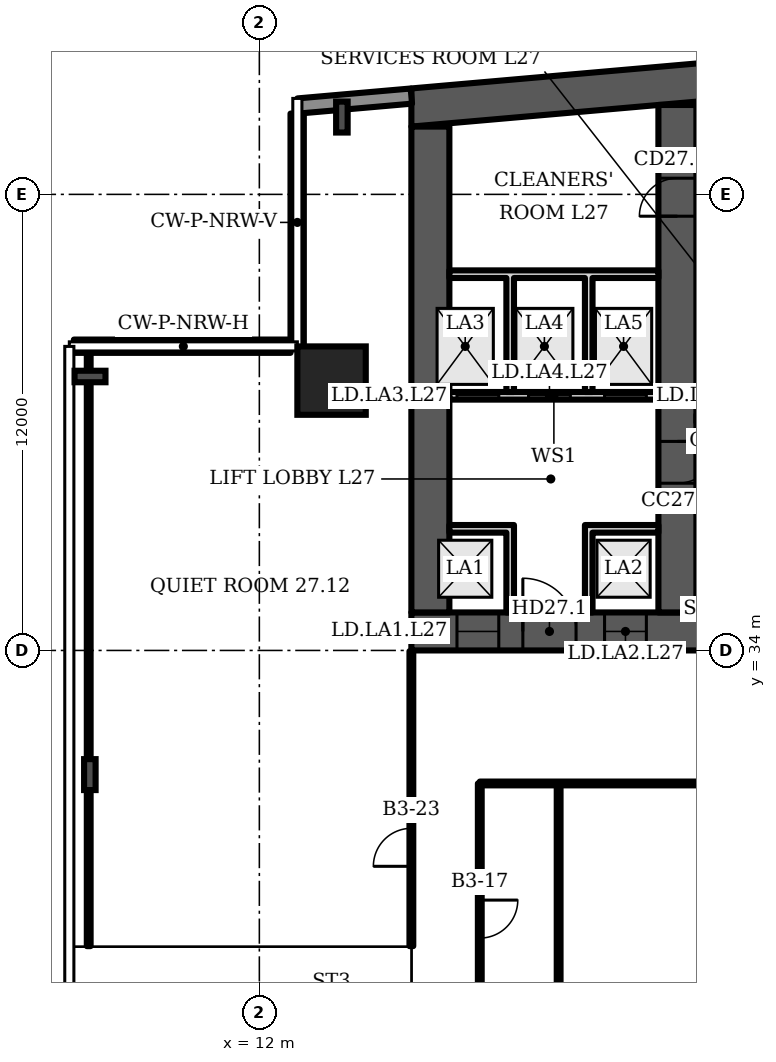
"""IFC4 building model, lengths in metres.
Left out: names, types, materials, properties, quantities, classifications, styles, units other than length and angle.
Written with IfcOpenShell. Run it as: python <this file> out.ifc"""

import sys

from ifc_helpers import new_model, si_unit, direction, frame, frame_2d, origin, origin_2d, place, context, subcontext, project, spatial, polyline, rectangle, i_section, outline, extrude, element, fill, save


model = new_model("IFC4")
c1 = context("Model", 3, precision=1e-05, world=origin(), true_north=direction((0.0, 1.0)))
c2 = subcontext(c1, "Body", "Model", "MODEL_VIEW")
j1 = project(units=[si_unit("LENGTHUNIT", "METRE"), si_unit("PLANEANGLEUNIT", "RADIAN")], contexts=[c1])
p1 = place(None, origin())
s1 = spatial("IfcSite", under=j1, at=p1, CompositionType="ELEMENT")
p2 = place(p1, origin())
s2 = spatial("IfcBuilding", under=s1, at=p2, CompositionType="ELEMENT")
p3 = place(p2, frame((0.0, 0.0, 118.3)))
s3 = spatial("IfcBuildingStorey", under=s2, at=p3, CompositionType="ELEMENT", Elevation=118.3)
p4 = place(p3, frame((0.0, 0.0, -0.0)))
e1 = element("IfcWall", 1, at=p4, inside=s3, PredefinedType="SHEAR", context=c2, shape_type="SweptSolid", body=[
    extrude(outline(polyline([(16.0, 47.784), (40.5, 49.927), (65.0, 47.784), (65.0, 48.787), (40.5, 50.931), (16.0, 48.787), (16.0, 47.784)])), origin(), (0.0, 0.0, 1.0), 3.6),
])
p5 = place(p3, frame((16.0, 34.5, 0.0), z_axis=(0.0, 0.0, 1.0), x_axis=(1.0, 0.0, 0.0)))
e2 = element("IfcWall", 2, at=p5, inside=s3, PredefinedType="SHEAR", context=c2, shape_type="SweptSolid", body=[
    extrude(rectangle(XDim=49.0, YDim=1.0, at=frame_2d((24.5, 0.0))), origin(), (0.0, 0.0, 1.0), 3.6),
])
p6 = place(p5, frame((1.2, 0.0, 0.0)))
e3 = element("IfcOpeningElement", 3, at=p6, cuts=e2, PredefinedType="OPENING", context=c2, shape_type="SweptSolid", body=[
    extrude(rectangle(XDim=1.1, YDim=2.1, at=frame_2d((0.55, 1.05))), frame((0.0, 0.51, 0.0), z_axis=(0.0, -1.0, 0.0), x_axis=(1.0, 0.0, 0.0)), (0.0, 0.0, 1.0), 1.02),
])
p7 = place(p5, frame((5.083, 0.0, 0.0)))
e4 = element("IfcOpeningElement", 4, at=p7, cuts=e2, PredefinedType="OPENING", context=c2, shape_type="SweptSolid", body=[
    extrude(rectangle(XDim=1.1, YDim=2.1, at=frame_2d((0.55, 1.05))), frame((0.0, 0.51, 0.0), z_axis=(0.0, -1.0, 0.0), x_axis=(1.0, 0.0, 0.0)), (0.0, 0.0, 1.0), 1.02),
])
p8 = place(p5, frame((2.933, 0.0, 0.0)))
e5 = element("IfcOpeningElement", 5, at=p8, cuts=e2, PredefinedType="OPENING", context=c2, shape_type="SweptSolid", body=[
    extrude(rectangle(XDim=1.4, YDim=2.1, at=frame_2d((0.7, 1.05))), frame((0.0, 0.51, 0.0), z_axis=(0.0, -1.0, 0.0), x_axis=(1.0, 0.0, 0.0)), (0.0, 0.0, 1.0), 1.02),
])
p9 = place(p5, frame((7.65, 0.0, 0.0)))
e6 = element("IfcOpeningElement", 6, at=p9, cuts=e2, PredefinedType="OPENING", context=c2, shape_type="SweptSolid", body=[
    extrude(rectangle(XDim=1.2, YDim=2.1, at=frame_2d((0.6, 1.05))), frame((0.0, 0.51, 0.0), z_axis=(0.0, -1.0, 0.0), x_axis=(1.0, 0.0, 0.0)), (0.0, 0.0, 1.0), 1.02),
])
p10 = place(p5, frame((14.817, 0.0, 0.0)))
e7 = element("IfcOpeningElement", 7, at=p10, cuts=e2, PredefinedType="OPENING", context=c2, shape_type="SweptSolid", body=[
    extrude(rectangle(XDim=1.1, YDim=2.1, at=frame_2d((0.55, 1.05))), frame((0.0, 0.51, 0.0), z_axis=(0.0, -1.0, 0.0), x_axis=(1.0, 0.0, 0.0)), (0.0, 0.0, 1.0), 1.02),
])
p11 = place(p5, frame((19.083, 0.0, 0.0)))
e8 = element("IfcOpeningElement", 8, at=p11, cuts=e2, PredefinedType="OPENING", context=c2, shape_type="SweptSolid", body=[
    extrude(rectangle(XDim=1.1, YDim=2.1, at=frame_2d((0.55, 1.05))), frame((0.0, 0.51, 0.0), z_axis=(0.0, -1.0, 0.0), x_axis=(1.0, 0.0, 0.0)), (0.0, 0.0, 1.0), 1.02),
])
p12 = place(p5, frame((16.8, 0.0, 0.0)))
e9 = element("IfcOpeningElement", 9, at=p12, cuts=e2, PredefinedType="OPENING", context=c2, shape_type="SweptSolid", body=[
    extrude(rectangle(XDim=1.4, YDim=2.1, at=frame_2d((0.7, 1.05))), frame((0.0, 0.51, 0.0), z_axis=(0.0, -1.0, 0.0), x_axis=(1.0, 0.0, 0.0)), (0.0, 0.0, 1.0), 1.02),
])
p13 = place(p5, frame((21.817, 0.0, 0.0)))
e10 = element("IfcOpeningElement", 10, at=p13, cuts=e2, PredefinedType="OPENING", context=c2, shape_type="SweptSolid", body=[
    extrude(rectangle(XDim=1.1, YDim=2.1, at=frame_2d((0.55, 1.05))), frame((0.0, 0.51, 0.0), z_axis=(0.0, -1.0, 0.0), x_axis=(1.0, 0.0, 0.0)), (0.0, 0.0, 1.0), 1.02),
])
p14 = place(p5, frame((26.083, 0.0, 0.0)))
e11 = element("IfcOpeningElement", 11, at=p14, cuts=e2, PredefinedType="OPENING", context=c2, shape_type="SweptSolid", body=[
    extrude(rectangle(XDim=1.1, YDim=2.1, at=frame_2d((0.55, 1.05))), frame((0.0, 0.51, 0.0), z_axis=(0.0, -1.0, 0.0), x_axis=(1.0, 0.0, 0.0)), (0.0, 0.0, 1.0), 1.02),
])
p15 = place(p5, frame((33.15, 0.0, 0.0)))
e12 = element("IfcOpeningElement", 12, at=p15, cuts=e2, PredefinedType="OPENING", context=c2, shape_type="SweptSolid", body=[
    extrude(rectangle(XDim=1.2, YDim=2.1, at=frame_2d((0.6, 1.05))), frame((0.0, 0.51, 0.0), z_axis=(0.0, -1.0, 0.0), x_axis=(1.0, 0.0, 0.0)), (0.0, 0.0, 1.0), 1.02),
])
p16 = place(p5, frame((37.8, 0.0, 0.0)))
e13 = element("IfcOpeningElement", 13, at=p16, cuts=e2, PredefinedType="OPENING", context=c2, shape_type="SweptSolid", body=[
    extrude(rectangle(XDim=1.4, YDim=2.1, at=frame_2d((0.7, 1.05))), frame((0.0, 0.51, 0.0), z_axis=(0.0, -1.0, 0.0), x_axis=(1.0, 0.0, 0.0)), (0.0, 0.0, 1.0), 1.02),
])
p17 = place(p5, frame((42.817, 0.0, 0.0)))
e14 = element("IfcOpeningElement", 14, at=p17, cuts=e2, PredefinedType="OPENING", context=c2, shape_type="SweptSolid", body=[
    extrude(rectangle(XDim=1.1, YDim=2.1, at=frame_2d((0.55, 1.05))), frame((0.0, 0.51, 0.0), z_axis=(0.0, -1.0, 0.0), x_axis=(1.0, 0.0, 0.0)), (0.0, 0.0, 1.0), 1.02),
])
p18 = place(p5, frame((46.7, 0.0, 0.0)))
e15 = element("IfcOpeningElement", 15, at=p18, cuts=e2, PredefinedType="OPENING", context=c2, shape_type="SweptSolid", body=[
    extrude(rectangle(XDim=1.1, YDim=2.1, at=frame_2d((0.55, 1.05))), frame((0.0, 0.51, 0.0), z_axis=(0.0, -1.0, 0.0), x_axis=(1.0, 0.0, 0.0)), (0.0, 0.0, 1.0), 1.02),
])
p19 = place(p5, frame((44.667, 0.0, 0.0)))
e16 = element("IfcOpeningElement", 16, at=p19, cuts=e2, PredefinedType="OPENING", context=c2, shape_type="SweptSolid", body=[
    extrude(rectangle(XDim=1.4, YDim=2.1, at=frame_2d((0.7, 1.05))), frame((0.0, 0.51, 0.0), z_axis=(0.0, -1.0, 0.0), x_axis=(1.0, 0.0, 0.0)), (0.0, 0.0, 1.0), 1.02),
])
p20 = place(p3, frame((16.5, 35.0, 0.0), z_axis=(0.0, 0.0, 1.0), x_axis=(0.0, 1.0, 0.0)))
e17 = element("IfcWall", 17, at=p20, inside=s3, PredefinedType="SHEAR", context=c2, shape_type="SweptSolid", body=[
    extrude(rectangle(XDim=12.784, YDim=1.0, at=frame_2d((6.392, 0.0))), origin(), (0.0, 0.0, 1.0), 3.6),
])
p21 = place(p3, frame((23.0, 35.0, 0.0), z_axis=(0.0, 0.0, 1.0), x_axis=(0.0, 1.0, 0.0)))
e18 = element("IfcWall", 18, at=p21, inside=s3, PredefinedType="SHEAR", context=c2, shape_type="SweptSolid", body=[
    extrude(rectangle(XDim=13.352, YDim=1.0, at=frame_2d((6.676, 0.0))), origin(), (0.0, 0.0, 1.0), 3.6),
])
p22 = place(p21, frame((10.426, 0.0, 0.0)))
e19 = element("IfcOpeningElement", 19, at=p22, cuts=e18, PredefinedType="OPENING", context=c2, shape_type="SweptSolid", body=[
    extrude(rectangle(XDim=1.0, YDim=2.1, at=frame_2d((0.5, 1.05))), frame((0.0, 0.51, 0.0), z_axis=(0.0, -1.0, 0.0), x_axis=(1.0, 0.0, 0.0)), (0.0, 0.0, 1.0), 1.02),
])
p23 = place(p21, frame((3.4, 0.0, 0.0)))
e20 = element("IfcOpeningElement", 20, at=p23, cuts=e18, PredefinedType="OPENING", context=c2, shape_type="SweptSolid", body=[
    extrude(rectangle(XDim=1.1, YDim=2.1, at=frame_2d((0.55, 1.05))), frame((0.0, 0.51, 0.0), z_axis=(0.0, -1.0, 0.0), x_axis=(1.0, 0.0, 0.0)), (0.0, 0.0, 1.0), 1.02),
])
p24 = place(p3, frame((13.9, 41.1, 0.0), z_axis=(0.0, 0.0, 1.0), x_axis=(1.0, 0.0, 0.0)))
e21 = element("IfcColumn", 21, at=p24, inside=s3, PredefinedType="COLUMN", context=c2, shape_type="SweptSolid", body=[
    extrude(rectangle(XDim=1.8, YDim=1.8, at=origin_2d()), origin(), (0.0, 0.0, 1.0), 3.6),
])
for number, where, z_axis, x_axis in (
    (22, (14.172, 48.034, 0.0), (0.0, 0.0, 1.0), (-1.0, 0.0, 0.0)),
    (23, (7.544, 41.208, 0.0), (0.0, 0.0, 1.0), (0.0, 1.0, 0.0)),
    (24, (7.54, 30.733, 0.0), (0.0, 0.0, 1.0), (-1.0, 0.0, 0.0)),
):
    element("IfcColumn", number, at=place(p3, frame(where, z_axis=z_axis, x_axis=x_axis)), inside=s3, PredefinedType="COLUMN", context=c2, shape_type="SweptSolid", body=[
        extrude(i_section(OverallWidth=0.303, OverallDepth=0.814, WebThickness=0.021, FlangeThickness=0.04, FilletRadius=0.03, at=origin_2d()), origin(), (0.0, 0.0, 1.0), 3.6),
    ])
p25 = place(p3, frame((16.0, 48.587, 0.0), z_axis=(0.0, 0.0, 1.0), x_axis=(-0.996194, -0.087168, 0.0)))
e25 = element("IfcWall", 25, at=p25, inside=s3, PredefinedType="SOLIDWALL", context=c2, shape_type="SweptSolid", body=[
    extrude(rectangle(XDim=2.994, YDim=0.4, at=frame_2d((1.497, 0.0))), origin(), (0.0, 0.0, 1.0), 3.2),
])
p26 = place(p3, frame((12.995, 48.126, 0.0), z_axis=(0.0, 0.0, 1.0), x_axis=(0.0, -1.0, 0.0)))
e26 = element("IfcWall", 26, at=p26, inside=s3, PredefinedType="SOLIDWALL", context=c2, shape_type="SweptSolid", body=[
    extrude(rectangle(XDim=6.126, YDim=0.35, at=frame_2d((3.063, 0.0))), origin(), (0.0, 0.0, 1.0), 1.0),
])
p27 = place(p3, frame((12.82, 42.005, 0.0), z_axis=(0.0, 0.0, 1.0), x_axis=(-1.0, 0.0, 0.0)))
e27 = element("IfcWall", 27, at=p27, inside=s3, PredefinedType="SOLIDWALL", context=c2, shape_type="SweptSolid", body=[
    extrude(rectangle(XDim=5.7, YDim=0.35, at=frame_2d((2.85, 0.0))), origin(), (0.0, 0.0, 1.0), 1.0),
])
p28 = place(p3, frame((17.0, 40.7, 0.0), z_axis=(0.0, 0.0, 1.0), x_axis=(1.0, 0.0, 0.0)))
e28 = element("IfcWall", 28, at=p28, inside=s3, PredefinedType="PARTITIONING", context=c2, shape_type="SweptSolid", body=[
    extrude(rectangle(XDim=5.5, YDim=0.2, at=frame_2d((2.75, 0.0))), origin(), (0.0, 0.0, 1.0), 3.2),
])
p29 = place(p28, frame((0.2, 0.0, 0.0)))
e29 = element("IfcOpeningElement", 29, at=p29, cuts=e28, PredefinedType="OPENING", context=c2, shape_type="SweptSolid", body=[
    extrude(rectangle(XDim=1.1, YDim=2.1, at=frame_2d((0.55, 1.05))), frame((0.0, 0.11, 0.0), z_axis=(0.0, -1.0, 0.0), x_axis=(1.0, 0.0, 0.0)), (0.0, 0.0, 1.0), 0.22),
])
p30 = place(p28, frame((2.083, 0.0, 0.0)))
e30 = element("IfcOpeningElement", 30, at=p30, cuts=e28, PredefinedType="OPENING", context=c2, shape_type="SweptSolid", body=[
    extrude(rectangle(XDim=1.1, YDim=2.1, at=frame_2d((0.55, 1.05))), frame((0.0, 0.11, 0.0), z_axis=(0.0, -1.0, 0.0), x_axis=(1.0, 0.0, 0.0)), (0.0, 0.0, 1.0), 0.22),
])
p31 = place(p28, frame((4.083, 0.0, 0.0)))
e31 = element("IfcOpeningElement", 31, at=p31, cuts=e28, PredefinedType="OPENING", context=c2, shape_type="SweptSolid", body=[
    extrude(rectangle(XDim=1.1, YDim=2.1, at=frame_2d((0.55, 1.05))), frame((0.0, 0.11, 0.0), z_axis=(0.0, -1.0, 0.0), x_axis=(1.0, 0.0, 0.0)), (0.0, 0.0, 1.0), 0.22),
])
p32 = place(p3, frame((0.0, 0.0, -0.0)))
e32 = element("IfcWall", 32, at=p32, inside=s3, PredefinedType="PARTITIONING", context=c2, shape_type="SweptSolid", body=[
    extrude(outline(polyline([(18.5, 37.1), (17.0, 37.1), (17.0, 37.3), (18.5, 37.3), (18.7, 37.3), (18.7, 35.0), (18.5, 35.0), (18.5, 37.1)])), origin(), (0.0, 0.0, 1.0), 3.2),
])
p33 = place(p3, frame((0.0, 0.0, -0.0)))
e33 = element("IfcWall", 33, at=p33, inside=s3, PredefinedType="PARTITIONING", context=c2, shape_type="SweptSolid", body=[
    extrude(outline(polyline([(20.567, 37.3), (20.767, 37.3), (22.5, 37.3), (22.5, 37.1), (20.767, 37.1), (20.767, 35.0), (20.567, 35.0), (20.567, 37.3)])), origin(), (0.0, 0.0, 1.0), 3.2),
])
p34 = place(p3, frame((0.0, 0.0, -0.0)))
e34 = element("IfcWall", 34, at=p34, inside=s3, PredefinedType="PARTITIONING", context=c2, shape_type="SweptSolid", body=[
    extrude(outline(polyline([(18.7, 40.8), (18.5, 40.8), (18.5, 43.8), (17.0, 43.8), (17.0, 44.0), (22.5, 44.0), (22.5, 43.8), (20.767, 43.8), (20.767, 40.8), (20.567, 40.8), (20.567, 43.8), (18.7, 43.8), (18.7, 40.8)])), origin(), (0.0, 0.0, 1.0), 3.2),
])
p35 = place(p3, frame((7.51, 26.22, 0.0), z_axis=(0.0, 0.0, 1.0), x_axis=(0.0, 1.0, 0.0)))
e35 = element("IfcWall", 35, at=p35, inside=s3, PredefinedType="PARTITIONING", context=c2, shape_type="SweptSolid", body=[
    extrude(rectangle(XDim=15.76, YDim=0.1, at=frame_2d((7.88, 0.0))), origin(), (0.0, 0.0, 1.0), 2.58),
])
p36 = place(p3, frame((16.0, 26.22, 0.0), z_axis=(0.0, 0.0, 1.0), x_axis=(0.0, 1.0, 0.0)))
e36 = element("IfcWall", 36, at=p36, inside=s3, PredefinedType="PARTITIONING", context=c2, shape_type="SweptSolid", body=[
    extrude(rectangle(XDim=7.76, YDim=0.1, at=frame_2d((3.88, 0.0))), origin(), (0.0, 0.0, 1.0), 3.2),
])
p37 = place(p36, frame((2.1, 0.0, 0.0)))
e37 = element("IfcOpeningElement", 37, at=p37, cuts=e36, PredefinedType="OPENING", context=c2, shape_type="SweptSolid", body=[
    extrude(rectangle(XDim=1.0, YDim=2.1, at=frame_2d((0.5, 1.05))), frame((0.0, 0.06, 0.0), z_axis=(0.0, -1.0, 0.0), x_axis=(1.0, 0.0, 0.0)), (0.0, 0.0, 1.0), 0.12),
])
p38 = place(p3, frame((17.8, 21.8, 0.0), z_axis=(0.0, 0.0, 1.0), x_axis=(0.0, 1.0, 0.0)))
e38 = element("IfcWall", 38, at=p38, inside=s3, PredefinedType="PARTITIONING", context=c2, shape_type="SweptSolid", body=[
    extrude(rectangle(XDim=8.7, YDim=0.1, at=frame_2d((4.35, 0.0))), origin(), (0.0, 0.0, 1.0), 3.2),
])
p39 = place(p38, frame((4.631, 0.0, 0.0)))
e39 = element("IfcOpeningElement", 39, at=p39, cuts=e38, PredefinedType="OPENING", context=c2, shape_type="SweptSolid", body=[
    extrude(rectangle(XDim=1.0, YDim=2.1, at=frame_2d((0.5, 1.05))), frame((0.0, 0.06, 0.0), z_axis=(0.0, -1.0, 0.0), x_axis=(1.0, 0.0, 0.0)), (0.0, 0.0, 1.0), 0.12),
])
p40 = place(p3, frame((17.8, 30.5, 0.0), z_axis=(0.0, 0.0, 1.0), x_axis=(1.0, 0.0, 0.0)))
e40 = element("IfcWall", 40, at=p40, inside=s3, PredefinedType="PARTITIONING", context=c2, shape_type="SweptSolid", body=[
    extrude(rectangle(XDim=13.8, YDim=0.1, at=frame_2d((6.9, 0.0))), origin(), (0.0, 0.0, 1.0), 3.2),
])
p41 = place(p3, frame((19.875, 15.13, 0.0), z_axis=(0.0, 0.0, 1.0), x_axis=(0.0, 1.0, 0.0)))
e41 = element("IfcWall", 41, at=p41, inside=s3, PredefinedType="PARTITIONING", context=c2, shape_type="SweptSolid", body=[
    extrude(rectangle(XDim=15.37, YDim=0.1, at=frame_2d((7.685, 0.0))), origin(), (0.0, 0.0, 1.0), 3.2),
])
p42 = place(p6, origin())
e42 = element("IfcDoor", 42, at=p42, inside=s3, OperationType="DOUBLE_DOOR_SLIDING", PredefinedType="DOOR", context=c2, shape_type="SweptSolid", body=[
    extrude(rectangle(XDim=1.1, YDim=2.1, at=frame_2d((0.55, 1.05))), frame((0.0, 0.025, 0.0), z_axis=(0.0, -1.0, 0.0), x_axis=(1.0, 0.0, 0.0)), (0.0, 0.0, 1.0), 0.05),
])
fill(e3, e42)
p43 = place(p7, origin())
e43 = element("IfcDoor", 43, at=p43, inside=s3, OperationType="DOUBLE_DOOR_SLIDING", PredefinedType="DOOR", context=c2, shape_type="SweptSolid", body=[
    extrude(rectangle(XDim=1.1, YDim=2.1, at=frame_2d((0.55, 1.05))), frame((0.0, 0.025, 0.0), z_axis=(0.0, -1.0, 0.0), x_axis=(1.0, 0.0, 0.0)), (0.0, 0.0, 1.0), 0.05),
])
fill(e4, e43)
p44 = place(p8, origin())
e44 = element("IfcDoor", 44, at=p44, inside=s3, OperationType="DOUBLE_DOOR_SINGLE_SWING", PredefinedType="DOOR", context=c2, shape_type="SweptSolid", body=[
    extrude(rectangle(XDim=1.4, YDim=2.1, at=frame_2d((0.7, 1.05))), frame((0.0, 0.025, 0.0), z_axis=(0.0, -1.0, 0.0), x_axis=(1.0, 0.0, 0.0)), (0.0, 0.0, 1.0), 0.05),
])
fill(e5, e44)
p45 = place(p29, origin())
e45 = element("IfcDoor", 45, at=p45, inside=s3, OperationType="DOUBLE_DOOR_SLIDING", PredefinedType="DOOR", context=c2, shape_type="SweptSolid", body=[
    extrude(rectangle(XDim=1.1, YDim=2.1, at=frame_2d((0.55, 1.05))), frame((0.0, 0.025, 0.0), z_axis=(0.0, -1.0, 0.0), x_axis=(1.0, 0.0, 0.0)), (0.0, 0.0, 1.0), 0.05),
])
fill(e29, e45)
p46 = place(p30, origin())
e46 = element("IfcDoor", 46, at=p46, inside=s3, OperationType="DOUBLE_DOOR_SLIDING", PredefinedType="DOOR", context=c2, shape_type="SweptSolid", body=[
    extrude(rectangle(XDim=1.1, YDim=2.1, at=frame_2d((0.55, 1.05))), frame((0.0, 0.025, 0.0), z_axis=(0.0, -1.0, 0.0), x_axis=(1.0, 0.0, 0.0)), (0.0, 0.0, 1.0), 0.05),
])
fill(e30, e46)
p47 = place(p31, origin())
e47 = element("IfcDoor", 47, at=p47, inside=s3, OperationType="DOUBLE_DOOR_SLIDING", PredefinedType="DOOR", context=c2, shape_type="SweptSolid", body=[
    extrude(rectangle(XDim=1.1, YDim=2.1, at=frame_2d((0.55, 1.05))), frame((0.0, 0.025, 0.0), z_axis=(0.0, -1.0, 0.0), x_axis=(1.0, 0.0, 0.0)), (0.0, 0.0, 1.0), 0.05),
])
fill(e31, e47)
p48 = place(p22, origin())
e48 = element("IfcDoor", 48, at=p48, inside=s3, OperationType="SINGLE_SWING_LEFT", PredefinedType="DOOR", context=c2, shape_type="SweptSolid", body=[
    extrude(rectangle(XDim=1.0, YDim=2.1, at=frame_2d((0.5, 1.05))), frame((0.0, 0.5, 0.0), z_axis=(0.0, -1.0, 0.0), x_axis=(1.0, 0.0, 0.0)), (0.0, 0.0, 1.0), 1.0),
])
fill(e19, e48)
p49 = place(p23, origin())
e49 = element("IfcDoor", 49, at=p49, inside=s3, OperationType="SINGLE_SWING_RIGHT", PredefinedType="DOOR", context=c2, shape_type="SweptSolid", body=[
    extrude(rectangle(XDim=1.1, YDim=2.1, at=frame_2d((0.55, 1.05))), frame((0.0, 0.025, 0.0), z_axis=(0.0, -1.0, 0.0), x_axis=(1.0, 0.0, 0.0)), (0.0, 0.0, 1.0), 0.05),
])
fill(e20, e49)
p50 = place(p39, origin())
e50 = element("IfcDoor", 50, at=p50, inside=s3, OperationType="SINGLE_SWING_RIGHT", PredefinedType="DOOR", context=c2, shape_type="SweptSolid", body=[
    extrude(rectangle(XDim=1.0, YDim=2.1, at=frame_2d((0.5, 1.05))), frame((0.0, 0.025, 0.0), z_axis=(0.0, -1.0, 0.0), x_axis=(1.0, 0.0, 0.0)), (0.0, 0.0, 1.0), 0.05),
])
fill(e39, e50)
p51 = place(p37, origin())
e51 = element("IfcDoor", 51, at=p51, inside=s3, OperationType="SINGLE_SWING_LEFT", PredefinedType="DOOR", context=c2, shape_type="SweptSolid", body=[
    extrude(rectangle(XDim=1.0, YDim=2.1, at=frame_2d((0.5, 1.05))), frame((0.0, 0.025, 0.0), z_axis=(0.0, -1.0, 0.0), x_axis=(1.0, 0.0, 0.0)), (0.0, 0.0, 1.0), 0.05),
])
fill(e37, e51)
save(model, sys.argv[1])
